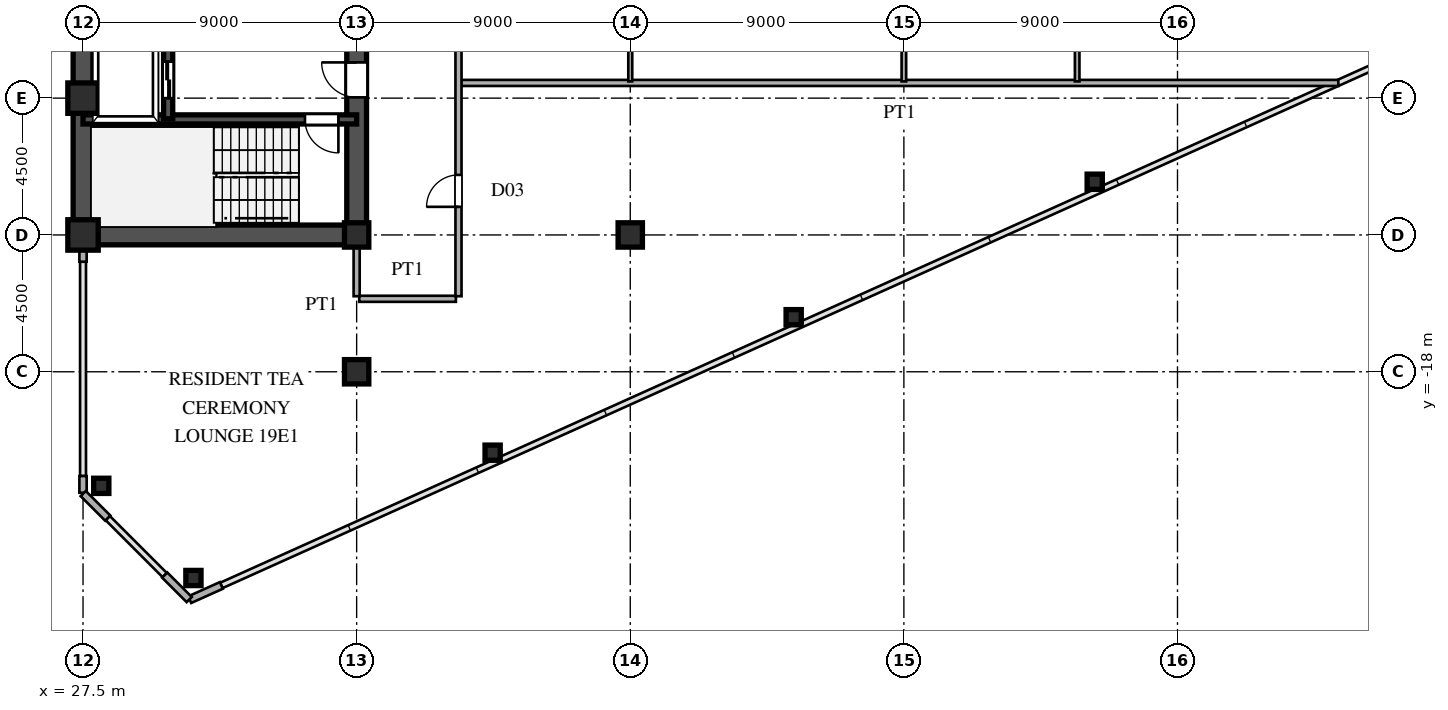
"""IFC4 building model, lengths in metres.
Left out: names, types, materials, properties, quantities, classifications, styles, units other than length and angle.
Written with IfcOpenShell. Run it as: python <this file> out.ifc"""

import sys

from ifc_helpers import new_model, si_unit, direction, frame, frame_2d, origin, origin_2d, place, context, subcontext, project, spatial, rectangle, hollow_rectangle, i_section, extrude, source, transform, mapped, element, fill, save


model = new_model("IFC4")
c1 = context("Model", 3, precision=1e-05, world=origin(), true_north=direction((0.0, 1.0)))
c2 = subcontext(c1, "Body", "Model", "MODEL_VIEW")
j1 = project(units=[si_unit("LENGTHUNIT", "METRE"), si_unit("PLANEANGLEUNIT", "RADIAN")], contexts=[c1])
p1 = place(None, origin())
s1 = spatial("IfcSite", under=j1, at=p1, CompositionType="ELEMENT")
p2 = place(p1, origin())
s2 = spatial("IfcBuilding", under=s1, at=p2, CompositionType="ELEMENT")
p3 = place(p2, frame((0.0, 0.0, 72.9)))
s3 = spatial("IfcBuildingStorey", under=s2, at=p3, CompositionType="ELEMENT", Elevation=72.9)
m1 = source(origin(), c2, "Body", "SweptSolid", [
    extrude(hollow_rectangle(XDim=1.0, YDim=1.0, WallThickness=0.042, at=origin_2d()), origin(), (0.0, 0.0, 1.0), 3.6),
])
for number, where, z_axis, x_axis in (
    (1, (27.5, -13.5, 0.0), (0.0, 0.0, 1.0), (1.0, 0.0, 0.0)),
    (2, (27.5, -9.0, 0.0), (0.0, 0.0, 1.0), (1.0, 0.0, 0.0)),
):
    element("IfcColumn", number, at=place(p3, frame(where, z_axis=z_axis, x_axis=x_axis)), inside=s3, PredefinedType="COLUMN", context=c2, shape_type="MappedRepresentation", body=[
        mapped(m1, transform((0.0, 0.0, 0.0), scale=1.0)),
    ])
m2 = source(origin(), c2, "Body", "SweptSolid", [
    extrude(i_section(OverallWidth=0.8, OverallDepth=0.8, WebThickness=0.032, FlangeThickness=0.05, at=origin_2d()), origin(), (0.0, 0.0, 1.0), 3.6),
])
for number, where, z_axis, x_axis in (
    (3, (36.5, -18.0, 0.0), (0.0, 0.0, 1.0), (1.0, 0.0, 0.0)),
    (4, (36.5, -13.5, 0.0), (0.0, 0.0, 1.0), (1.0, 0.0, 0.0)),
    (5, (45.5, -13.5, 0.0), (0.0, 0.0, 1.0), (1.0, 0.0, 0.0)),
):
    element("IfcColumn", number, at=place(p3, frame(where, z_axis=z_axis, x_axis=x_axis)), inside=s3, PredefinedType="COLUMN", context=c2, shape_type="MappedRepresentation", body=[
        mapped(m2, transform((0.0, 0.0, 0.0), scale=1.0)),
    ])
m3 = source(origin(), c2, "Body", "SweptSolid", [
    extrude(hollow_rectangle(XDim=0.5, YDim=0.5, WallThickness=0.02, at=origin_2d()), origin(), (0.0, 0.0, 1.0), 3.6),
])
for number, where, z_axis, x_axis in (
    (6, (31.131, -24.783, 0.0), (0.0, 0.0, 1.0), (1.0, 0.0, 0.0)),
    (7, (28.1, -21.751, 0.0), (0.0, 0.0, 1.0), (1.0, 0.0, 0.0)),
    (8, (40.973, -20.661, 0.0), (0.0, 0.0, 1.0), (1.0, 0.0, 0.0)),
    (9, (50.875, -16.205, 0.0), (0.0, 0.0, 1.0), (1.0, 0.0, 0.0)),
    (10, (60.778, -11.749, 0.0), (0.0, 0.0, 1.0), (1.0, 0.0, 0.0)),
):
    element("IfcColumn", number, at=place(p3, frame(where, z_axis=z_axis, x_axis=x_axis)), inside=s3, PredefinedType="COLUMN", context=c2, shape_type="MappedRepresentation", body=[
        mapped(m3, transform((0.0, 0.0, 0.0), scale=1.0)),
    ])
p4 = place(p3, frame((31.009, -25.496, 0.0), z_axis=(0.0, 0.0, 1.0), x_axis=(0.911929519623, 0.410346866979, 0.0)))
e11 = element("IfcWall", 11, at=p4, inside=s3, PredefinedType="SOLIDWALL", context=c2, shape_type="SweptSolid", body=[
    extrude(rectangle(XDim=1.14, YDim=0.24, at=frame_2d((0.57, 0.0))), origin(), (0.0, 0.0, 1.0), 3.38),
])
p5 = place(p3, frame((27.5, -21.98, 0.0), z_axis=(0.0, 0.0, 1.0), x_axis=(0.0, 1.0, 0.0)))
e12 = element("IfcWall", 12, at=p5, inside=s3, PredefinedType="SOLIDWALL", context=c2, shape_type="SweptSolid", body=[
    extrude(rectangle(XDim=0.55, YDim=0.24, at=frame_2d((0.275, 0.0))), origin(), (0.0, 0.0, 1.0), 3.38),
])
p6 = place(p3, frame((27.5, -14.38, 0.0), z_axis=(0.0, 0.0, 1.0), x_axis=(0.0, 1.0, 0.0)))
e13 = element("IfcWall", 13, at=p6, inside=s3, PredefinedType="SOLIDWALL", context=c2, shape_type="SweptSolid", body=[
    extrude(rectangle(XDim=0.55, YDim=0.24, at=frame_2d((0.275, 0.0))), origin(), (0.0, 0.0, 1.0), 2.88),
])
for number, where, z_axis, x_axis in (
    (14, (27.507, -22.007, 0.0), (0.0, 0.0, 1.0), (0.707, -0.707, 0.0)),
    (15, (30.187, -24.687, 0.0), (0.0, 0.0, 1.0), (0.707, -0.707, 0.0)),
):
    element("IfcWall", number, at=place(p3, frame(where, z_axis=z_axis, x_axis=x_axis)), inside=s3, PredefinedType="SOLIDWALL", context=c2, shape_type="SweptSolid", body=[
        extrude(rectangle(XDim=1.14, YDim=0.24, at=frame_2d((0.57, 0.0))), origin(), (0.0, 0.0, 1.0), 3.38),
    ])
p7 = place(p3, frame((27.5, -13.5, 0.0), z_axis=(0.0, 0.0, 1.0), x_axis=(0.0, 1.0, 0.0)))
e16 = element("IfcWall", 16, at=p7, inside=s3, PredefinedType="SHEAR", context=c2, shape_type="SweptSolid", body=[
    extrude(rectangle(XDim=12.2, YDim=0.65, at=frame_2d((6.1, 0.0))), origin(), (0.0, 0.0, 1.0), 3.38),
])
p8 = place(p3, frame((27.5, -13.5, 0.0), z_axis=(0.0, 0.0, 1.0), x_axis=(1.0, 0.0, 0.0)))
e17 = element("IfcWall", 17, at=p8, inside=s3, PredefinedType="SHEAR", context=c2, shape_type="SweptSolid", body=[
    extrude(rectangle(XDim=9.0, YDim=0.65, at=frame_2d((4.5, 0.0))), origin(), (0.0, 0.0, 1.0), 3.38),
])
p9 = place(p3, frame((36.5, -13.65, 0.0), z_axis=(0.0, 0.0, 1.0), x_axis=(0.0, 1.0, 0.0)))
e18 = element("IfcWall", 18, at=p9, inside=s3, PredefinedType="SHEAR", context=c2, shape_type="SweptSolid", body=[
    extrude(rectangle(XDim=7.15, YDim=0.65, at=frame_2d((3.575, 0.0))), origin(), (0.0, 0.0, 1.0), 3.38),
])
p10 = place(p9, frame((4.675, 0.0, 0.0)))
e19 = element("IfcOpeningElement", 19, at=p10, cuts=e18, PredefinedType="OPENING", context=c2, shape_type="SweptSolid", body=[
    extrude(rectangle(XDim=1.15, YDim=2.2, at=frame_2d((0.575, 1.1))), frame((0.0, 0.335, 0.0), z_axis=(0.0, -1.0, 0.0), x_axis=(1.0, 0.0, 0.0)), (0.0, 0.0, 1.0), 0.67),
])
p11 = place(p3, frame((27.5, -9.7, 0.0), z_axis=(0.0, 0.0, 1.0), x_axis=(1.0, 0.0, 0.0)))
e20 = element("IfcWall", 20, at=p11, inside=s3, PredefinedType="SHEAR", context=c2, shape_type="SweptSolid", body=[
    extrude(rectangle(XDim=9.0, YDim=0.3, at=frame_2d((4.5, 0.0))), origin(), (0.0, 0.0, 1.0), 3.38),
])
p12 = place(p11, frame((7.3, 0.0, 0.0)))
e21 = element("IfcOpeningElement", 21, at=p12, cuts=e20, PredefinedType="OPENING", context=c2, shape_type="SweptSolid", body=[
    extrude(rectangle(XDim=1.1, YDim=2.2, at=frame_2d((0.55, 1.1))), frame((0.0, 0.16, 0.0), z_axis=(0.0, -1.0, 0.0), x_axis=(1.0, 0.0, 0.0)), (0.0, 0.0, 1.0), 0.32),
])
p13 = place(p3, frame((30.3, -9.68, 0.0), z_axis=(0.0, 0.0, 1.0), x_axis=(0.0, 1.0, 0.0)))
e22 = element("IfcWall", 22, at=p13, inside=s3, PredefinedType="SHEAR", context=c2, shape_type="SweptSolid", body=[
    extrude(rectangle(XDim=2.56, YDim=0.3, at=frame_2d((1.28, 0.0))), origin(), (0.0, 0.0, 1.0), 3.38),
])
p14 = place(p13, frame((0.68, 0.0, 0.0)))
e23 = element("IfcOpeningElement", 23, at=p14, cuts=e22, PredefinedType="OPENING", context=c2, shape_type="SweptSolid", body=[
    extrude(rectangle(XDim=1.2, YDim=2.25, at=frame_2d((0.6, 1.125))), frame((0.0, 0.16, 0.0), z_axis=(0.0, -1.0, 0.0), x_axis=(1.0, 0.0, 0.0)), (0.0, 0.0, 1.0), 0.32),
])
p15 = place(p3, frame((36.585, -15.6, 0.0), z_axis=(0.0, 0.0, 1.0), x_axis=(1.0, 0.0, 0.0)))
e24 = element("IfcWall", 24, at=p15, inside=s3, PredefinedType="PARTITIONING", context=c2, shape_type="SweptSolid", body=[
    extrude(rectangle(XDim=3.18, YDim=0.2, at=frame_2d((1.59, 0.0))), origin(), (0.0, 0.0, 1.0), 3.38),
])
p16 = place(p3, frame((39.93, -8.5, 0.0), z_axis=(0.0, 0.0, 1.0), x_axis=(1.0, 0.0, 0.0)))
e25 = element("IfcWall", 25, at=p16, inside=s3, PredefinedType="PARTITIONING", context=c2, shape_type="SweptSolid", body=[
    extrude(rectangle(XDim=28.86, YDim=0.2, at=frame_2d((14.43, 0.0))), origin(), (0.0, 0.0, 1.0), 3.38),
])
p17 = place(p3, frame((36.5, -15.515, 0.0), z_axis=(0.0, 0.0, 1.0), x_axis=(0.0, 1.0, 0.0)))
e26 = element("IfcWall", 26, at=p17, inside=s3, PredefinedType="PARTITIONING", context=c2, shape_type="SweptSolid", body=[
    extrude(rectangle(XDim=1.685, YDim=0.2, at=frame_2d((0.842, 0.0))), origin(), (0.0, 0.0, 1.0), 2.68),
])
p18 = place(p3, frame((39.85, -15.515, 0.0), z_axis=(0.0, 0.0, 1.0), x_axis=(0.0, 1.0, 0.0)))
e27 = element("IfcWall", 27, at=p18, inside=s3, PredefinedType="PARTITIONING", context=c2, shape_type="SweptSolid", body=[
    extrude(rectangle(XDim=31.03, YDim=0.2, at=frame_2d((15.515, 0.0))), origin(), (0.0, 0.0, 1.0), 3.38),
])
p19 = place(p18, frame((2.94, 0.0, 0.0)))
e28 = element("IfcOpeningElement", 28, at=p19, cuts=e27, PredefinedType="OPENING", context=c2, shape_type="SweptSolid", body=[
    extrude(rectangle(XDim=1.05, YDim=2.25, at=frame_2d((0.525, 1.125))), frame((0.0, 0.11, 0.0), z_axis=(0.0, -1.0, 0.0), x_axis=(1.0, 0.0, 0.0)), (0.0, 0.0, 1.0), 0.22),
])
p20 = place(p18, frame((13.28, 0.0, 0.0)))
e29 = element("IfcOpeningElement", 29, at=p20, cuts=e27, PredefinedType="OPENING", context=c2, shape_type="SweptSolid", body=[
    extrude(rectangle(XDim=1.05, YDim=2.25, at=frame_2d((0.525, 1.125))), frame((0.0, 0.11, 0.0), z_axis=(0.0, -1.0, 0.0), x_axis=(1.0, 0.0, 0.0)), (0.0, 0.0, 1.0), 0.22),
])
p21 = place(p18, frame((25.567, 0.0, 0.0)))
e30 = element("IfcOpeningElement", 30, at=p21, cuts=e27, PredefinedType="OPENING", context=c2, shape_type="SweptSolid", body=[
    extrude(rectangle(XDim=1.05, YDim=2.25, at=frame_2d((0.525, 1.125))), frame((0.0, 0.11, 0.0), z_axis=(0.0, -1.0, 0.0), x_axis=(1.0, 0.0, 0.0)), (0.0, 0.0, 1.0), 0.22),
])
p22 = place(p3, frame((45.5, -8.45, 0.0), z_axis=(0.0, 0.0, 1.0), x_axis=(0.0, 1.0, 0.0)))
e31 = element("IfcWall", 31, at=p22, inside=s3, PredefinedType="PARTITIONING", context=c2, shape_type="SweptSolid", body=[
    extrude(rectangle(XDim=9.233, YDim=0.13, at=frame_2d((4.616, 0.0))), origin(), (0.0, 0.0, 1.0), 2.68),
])
p23 = place(p22, frame((6.475, 0.0, 0.0)))
e32 = element("IfcOpeningElement", 32, at=p23, cuts=e31, PredefinedType="OPENING", context=c2, shape_type="SweptSolid", body=[
    extrude(rectangle(XDim=0.95, YDim=2.15, at=frame_2d((0.475, 1.075))), frame((0.0, 0.075, 0.0), z_axis=(0.0, -1.0, 0.0), x_axis=(1.0, 0.0, 0.0)), (0.0, 0.0, 1.0), 0.15),
])
p24 = place(p3, frame((54.5, -8.45, 0.0), z_axis=(0.0, 0.0, 1.0), x_axis=(0.0, 1.0, 0.0)))
e33 = element("IfcWall", 33, at=p24, inside=s3, PredefinedType="PARTITIONING", context=c2, shape_type="SweptSolid", body=[
    extrude(rectangle(XDim=22.883, YDim=0.15, at=frame_2d((11.441, 0.0))), origin(), (0.0, 0.0, 1.0), 2.68),
])
p25 = place(p24, frame((6.475, 0.0, 0.0)))
e34 = element("IfcOpeningElement", 34, at=p25, cuts=e33, PredefinedType="OPENING", context=c2, shape_type="SweptSolid", body=[
    extrude(rectangle(XDim=0.95, YDim=2.15, at=frame_2d((0.475, 1.075))), frame((0.0, 0.085, 0.0), z_axis=(0.0, -1.0, 0.0), x_axis=(1.0, 0.0, 0.0)), (0.0, 0.0, 1.0), 0.17),
])
p26 = place(p24, frame((20.212, 0.0, 0.0)))
e35 = element("IfcOpeningElement", 35, at=p26, cuts=e33, PredefinedType="OPENING", context=c2, shape_type="SweptSolid", body=[
    extrude(rectangle(XDim=0.95, YDim=2.15, at=frame_2d((0.475, 1.075))), frame((0.0, 0.085, 0.0), z_axis=(0.0, -1.0, 0.0), x_axis=(1.0, 0.0, 0.0)), (0.0, 0.0, 1.0), 0.17),
])
p27 = place(p24, frame((15.721, 0.0, 0.0)))
e36 = element("IfcOpeningElement", 36, at=p27, cuts=e33, PredefinedType="OPENING", context=c2, shape_type="SweptSolid", body=[
    extrude(rectangle(XDim=0.95, YDim=2.15, at=frame_2d((0.475, 1.075))), frame((0.0, 0.085, 0.0), z_axis=(0.0, -1.0, 0.0), x_axis=(1.0, 0.0, 0.0)), (0.0, 0.0, 1.0), 0.17),
])
p28 = place(p3, frame((60.2, -8.45, 0.0), z_axis=(0.0, 0.0, 1.0), x_axis=(0.0, 1.0, 0.0)))
e37 = element("IfcWall", 37, at=p28, inside=s3, PredefinedType="PARTITIONING", context=c2, shape_type="SweptSolid", body=[
    extrude(rectangle(XDim=18.392, YDim=0.15, at=frame_2d((9.196, 0.0))), origin(), (0.0, 0.0, 1.0), 3.38),
])
p29 = place(p28, frame((1.808, 0.0, 0.0)))
e38 = element("IfcOpeningElement", 38, at=p29, cuts=e37, PredefinedType="OPENING", context=c2, shape_type="SweptSolid", body=[
    extrude(rectangle(XDim=0.95, YDim=2.15, at=frame_2d((0.475, 1.075))), frame((0.0, 0.085, 0.0), z_axis=(0.0, -1.0, 0.0), x_axis=(1.0, 0.0, 0.0)), (0.0, 0.0, 1.0), 0.17),
])
p30 = place(p28, frame((6.475, 0.0, 0.0)))
e39 = element("IfcOpeningElement", 39, at=p30, cuts=e37, PredefinedType="OPENING", context=c2, shape_type="SweptSolid", body=[
    extrude(rectangle(XDim=0.95, YDim=2.15, at=frame_2d((0.475, 1.075))), frame((0.0, 0.085, 0.0), z_axis=(0.0, -1.0, 0.0), x_axis=(1.0, 0.0, 0.0)), (0.0, 0.0, 1.0), 0.17),
])
p31 = place(p28, frame((11.142, 0.0, 0.0)))
e40 = element("IfcOpeningElement", 40, at=p31, cuts=e37, PredefinedType="OPENING", context=c2, shape_type="SweptSolid", body=[
    extrude(rectangle(XDim=0.95, YDim=2.15, at=frame_2d((0.475, 1.075))), frame((0.0, 0.085, 0.0), z_axis=(0.0, -1.0, 0.0), x_axis=(1.0, 0.0, 0.0)), (0.0, 0.0, 1.0), 0.17),
])
p32 = place(p28, frame((15.721, 0.0, 0.0)))
e41 = element("IfcOpeningElement", 41, at=p32, cuts=e37, PredefinedType="OPENING", context=c2, shape_type="SweptSolid", body=[
    extrude(rectangle(XDim=0.95, YDim=2.15, at=frame_2d((0.475, 1.075))), frame((0.0, 0.085, 0.0), z_axis=(0.0, -1.0, 0.0), x_axis=(1.0, 0.0, 0.0)), (0.0, 0.0, 1.0), 0.17),
])
m4 = source(origin(), c2, "Body", "SweptSolid", [
    extrude(rectangle(XDim=1.15, YDim=2.2, at=frame_2d((0.575, 1.1))), frame((0.0, 0.025, 0.0), z_axis=(0.0, -1.0, 0.0), x_axis=(1.0, 0.0, 0.0)), (0.0, 0.0, 1.0), 0.05),
])
p33 = place(p10, origin())
e42 = element("IfcDoor", 42, at=p33, inside=s3, OperationType="SINGLE_SWING_RIGHT", PredefinedType="DOOR", context=c2, shape_type="MappedRepresentation", body=[
    mapped(m4, transform((0.0, 0.0, 0.0), scale=1.0)),
])
fill(e19, e42)
m5 = source(origin(), c2, "Body", "SweptSolid", [
    extrude(rectangle(XDim=1.1, YDim=2.2, at=frame_2d((0.55, 1.1))), frame((0.0, 0.025, 0.0), z_axis=(0.0, -1.0, 0.0), x_axis=(1.0, 0.0, 0.0)), (0.0, 0.0, 1.0), 0.05),
])
p34 = place(p12, frame((1.1, 0.0, 0.0), z_axis=(0.0, 0.0, 1.0), x_axis=(-1.0, 0.0, 0.0)))
e43 = element("IfcDoor", 43, at=p34, inside=s3, OperationType="SINGLE_SWING_RIGHT", PredefinedType="DOOR", context=c2, shape_type="MappedRepresentation", body=[
    mapped(m5, transform((0.0, 0.0, 0.0), scale=1.0)),
])
fill(e21, e43)
m6 = source(origin(), c2, "Body", "SweptSolid", [
    extrude(rectangle(XDim=1.2, YDim=2.25, at=frame_2d((0.6, 1.125))), frame((0.0, 0.025, 0.0), z_axis=(0.0, -1.0, 0.0), x_axis=(1.0, 0.0, 0.0)), (0.0, 0.0, 1.0), 0.05),
])
p35 = place(p14, origin())
e44 = element("IfcDoor", 44, at=p35, inside=s3, OperationType="DOUBLE_DOOR_SLIDING", PredefinedType="DOOR", context=c2, shape_type="MappedRepresentation", body=[
    mapped(m6, transform((0.0, 0.0, 0.0), scale=1.0)),
])
fill(e23, e44)
m7 = source(origin(), c2, "Body", "SweptSolid", [
    extrude(rectangle(XDim=1.05, YDim=2.25, at=frame_2d((0.525, 1.125))), frame((0.0, 0.025, 0.0), z_axis=(0.0, -1.0, 0.0), x_axis=(1.0, 0.0, 0.0)), (0.0, 0.0, 1.0), 0.05),
])
p36 = place(p19, origin())
e45 = element("IfcDoor", 45, at=p36, inside=s3, OperationType="SINGLE_SWING_LEFT", PredefinedType="DOOR", context=c2, shape_type="MappedRepresentation", body=[
    mapped(m7, transform((0.0, 0.0, 0.0), scale=1.0)),
])
fill(e28, e45)
save(model, sys.argv[1])
